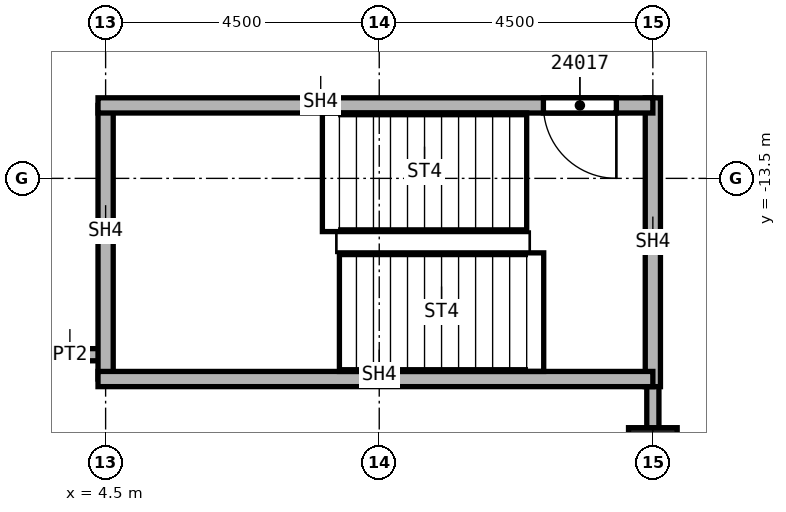
"""IFC4 building model, lengths in metres.
Left out: names, types, materials, properties, quantities, classifications, styles, units other than length and angle.
Written with IfcOpenShell. Run it as: python <this file> out.ifc"""

import sys

from ifc_helpers import new_model, si_unit, direction, frame, frame_2d, origin, origin_2d, place, context, subcontext, project, spatial, rectangle, extrude, element, fill, save


model = new_model("IFC4")
c1 = context("Model", 3, precision=1e-05, world=origin(), true_north=direction((0.0, 1.0)))
c2 = subcontext(c1, "Body", "Model", "MODEL_VIEW")
j1 = project(units=[si_unit("LENGTHUNIT", "METRE"), si_unit("PLANEANGLEUNIT", "RADIAN")], contexts=[c1])
p1 = place(None, origin())
s1 = spatial("IfcSite", under=j1, at=p1, CompositionType="ELEMENT")
p2 = place(p1, origin())
s2 = spatial("IfcBuilding", under=s1, at=p2, CompositionType="ELEMENT")
p3 = place(p2, frame((0.0, 0.0, 346.0)))
s3 = spatial("IfcBuildingStorey", under=s2, at=p3, CompositionType="ELEMENT", Elevation=346.0)
p4 = place(p3, frame((13.5, -18.0, 0.0), z_axis=(0.0, 0.0, 1.0), x_axis=(1.0, 0.0, 0.0)))
e1 = element("IfcColumn", 1, at=p4, inside=s3, PredefinedType="COLUMN", context=c2, shape_type="SweptSolid", body=[
    extrude(rectangle(XDim=0.8, YDim=0.8, at=origin_2d()), origin(), (0.0, 0.0, 1.0), 3.59),
])
p5 = place(p3, frame((4.5, -16.4, 0.0), z_axis=(0.0, 0.0, 1.0), x_axis=(-1.0, 0.0, 0.0)))
e2 = element("IfcWall", 2, at=p5, inside=s3, PredefinedType="PARTITIONING", context=c2, shape_type="SweptSolid", body=[
    extrude(rectangle(XDim=1.05, YDim=0.2, at=frame_2d((0.525, 0.0))), origin(), (0.0, 0.0, 1.0), 3.59),
])
p6 = place(p3, frame((13.5, -24.95, 0.0), z_axis=(0.0, 0.0, 1.0), x_axis=(0.0, 1.0, 0.0)))
e3 = element("IfcWall", 3, at=p6, inside=s3, PredefinedType="PARTITIONING", context=c2, shape_type="SweptSolid", body=[
    extrude(rectangle(XDim=8.275, YDim=0.2, at=frame_2d((4.137, 0.0))), origin(), (0.0, 0.0, 1.0), 3.59),
])
p7 = place(p6, frame((1.0, 0.0, 0.0)))
e4 = element("IfcOpeningElement", 4, at=p7, cuts=e3, PredefinedType="OPENING", context=c2, shape_type="SweptSolid", body=[
    extrude(rectangle(XDim=1.0, YDim=2.1, at=frame_2d((0.5, 1.05))), frame((0.0, 0.1, 0.0), z_axis=(0.0, -1.0, 0.0), x_axis=(1.0, 0.0, 0.0)), (0.0, 0.0, 1.0), 0.2),
])
p8 = place(p3, frame((4.5, -16.8, 0.0), z_axis=(0.0, 0.0, 1.0), x_axis=(0.0, 1.0, 0.0)))
e5 = element("IfcWall", 5, at=p8, inside=s3, PredefinedType="SOLIDWALL", context=c2, shape_type="SweptSolid", body=[
    extrude(rectangle(XDim=4.5, YDim=0.25, at=frame_2d((2.25, 0.0))), origin(), (0.0, 0.0, 1.0), 3.59),
])
p9 = place(p3, frame((13.5, -16.925, 0.0), z_axis=(0.0, 0.0, 1.0), x_axis=(0.0, 1.0, 0.0)))
e6 = element("IfcWall", 6, at=p9, inside=s3, PredefinedType="SOLIDWALL", context=c2, shape_type="SweptSolid", body=[
    extrude(rectangle(XDim=4.75, YDim=0.25, at=frame_2d((2.375, 0.0))), origin(), (0.0, 0.0, 1.0), 3.59),
])
p10 = place(p3, frame((13.5, -16.8, 0.0), z_axis=(0.0, 0.0, 1.0), x_axis=(-1.0, 0.0, 0.0)))
e7 = element("IfcWall", 7, at=p10, inside=s3, PredefinedType="SOLIDWALL", context=c2, shape_type="SweptSolid", body=[
    extrude(rectangle(XDim=9.125, YDim=0.25, at=frame_2d((4.562, 0.0))), origin(), (0.0, 0.0, 1.0), 3.59),
])
p11 = place(p3, frame((13.5, -12.3, 0.0), z_axis=(0.0, 0.0, 1.0), x_axis=(-1.0, 0.0, 0.0)))
e8 = element("IfcWall", 8, at=p11, inside=s3, PredefinedType="SOLIDWALL", context=c2, shape_type="SweptSolid", body=[
    extrude(rectangle(XDim=9.125, YDim=0.25, at=frame_2d((4.562, 0.0))), origin(), (0.0, 0.0, 1.0), 3.59),
])
p12 = place(p11, frame((0.6, 0.0, 0.0)))
e9 = element("IfcOpeningElement", 9, at=p12, cuts=e8, PredefinedType="OPENING", context=c2, shape_type="SweptSolid", body=[
    extrude(rectangle(XDim=1.2, YDim=2.1, at=frame_2d((0.6, 1.05))), frame((0.0, 0.125, 0.0), z_axis=(0.0, -1.0, 0.0), x_axis=(1.0, 0.0, 0.0)), (0.0, 0.0, 1.0), 0.25),
])
p13 = place(p12, origin())
e10 = element("IfcDoor", 10, at=p13, inside=s3, OperationType="SINGLE_SWING_RIGHT", PredefinedType="DOOR", context=c2, shape_type="SweptSolid", body=[
    extrude(rectangle(XDim=1.2, YDim=2.1, at=frame_2d((0.6, 1.05))), frame((0.0, 0.025, 0.0), z_axis=(0.0, -1.0, 0.0), x_axis=(1.0, 0.0, 0.0)), (0.0, 0.0, 1.0), 0.05),
])
fill(e9, e10)
save(model, sys.argv[1])
